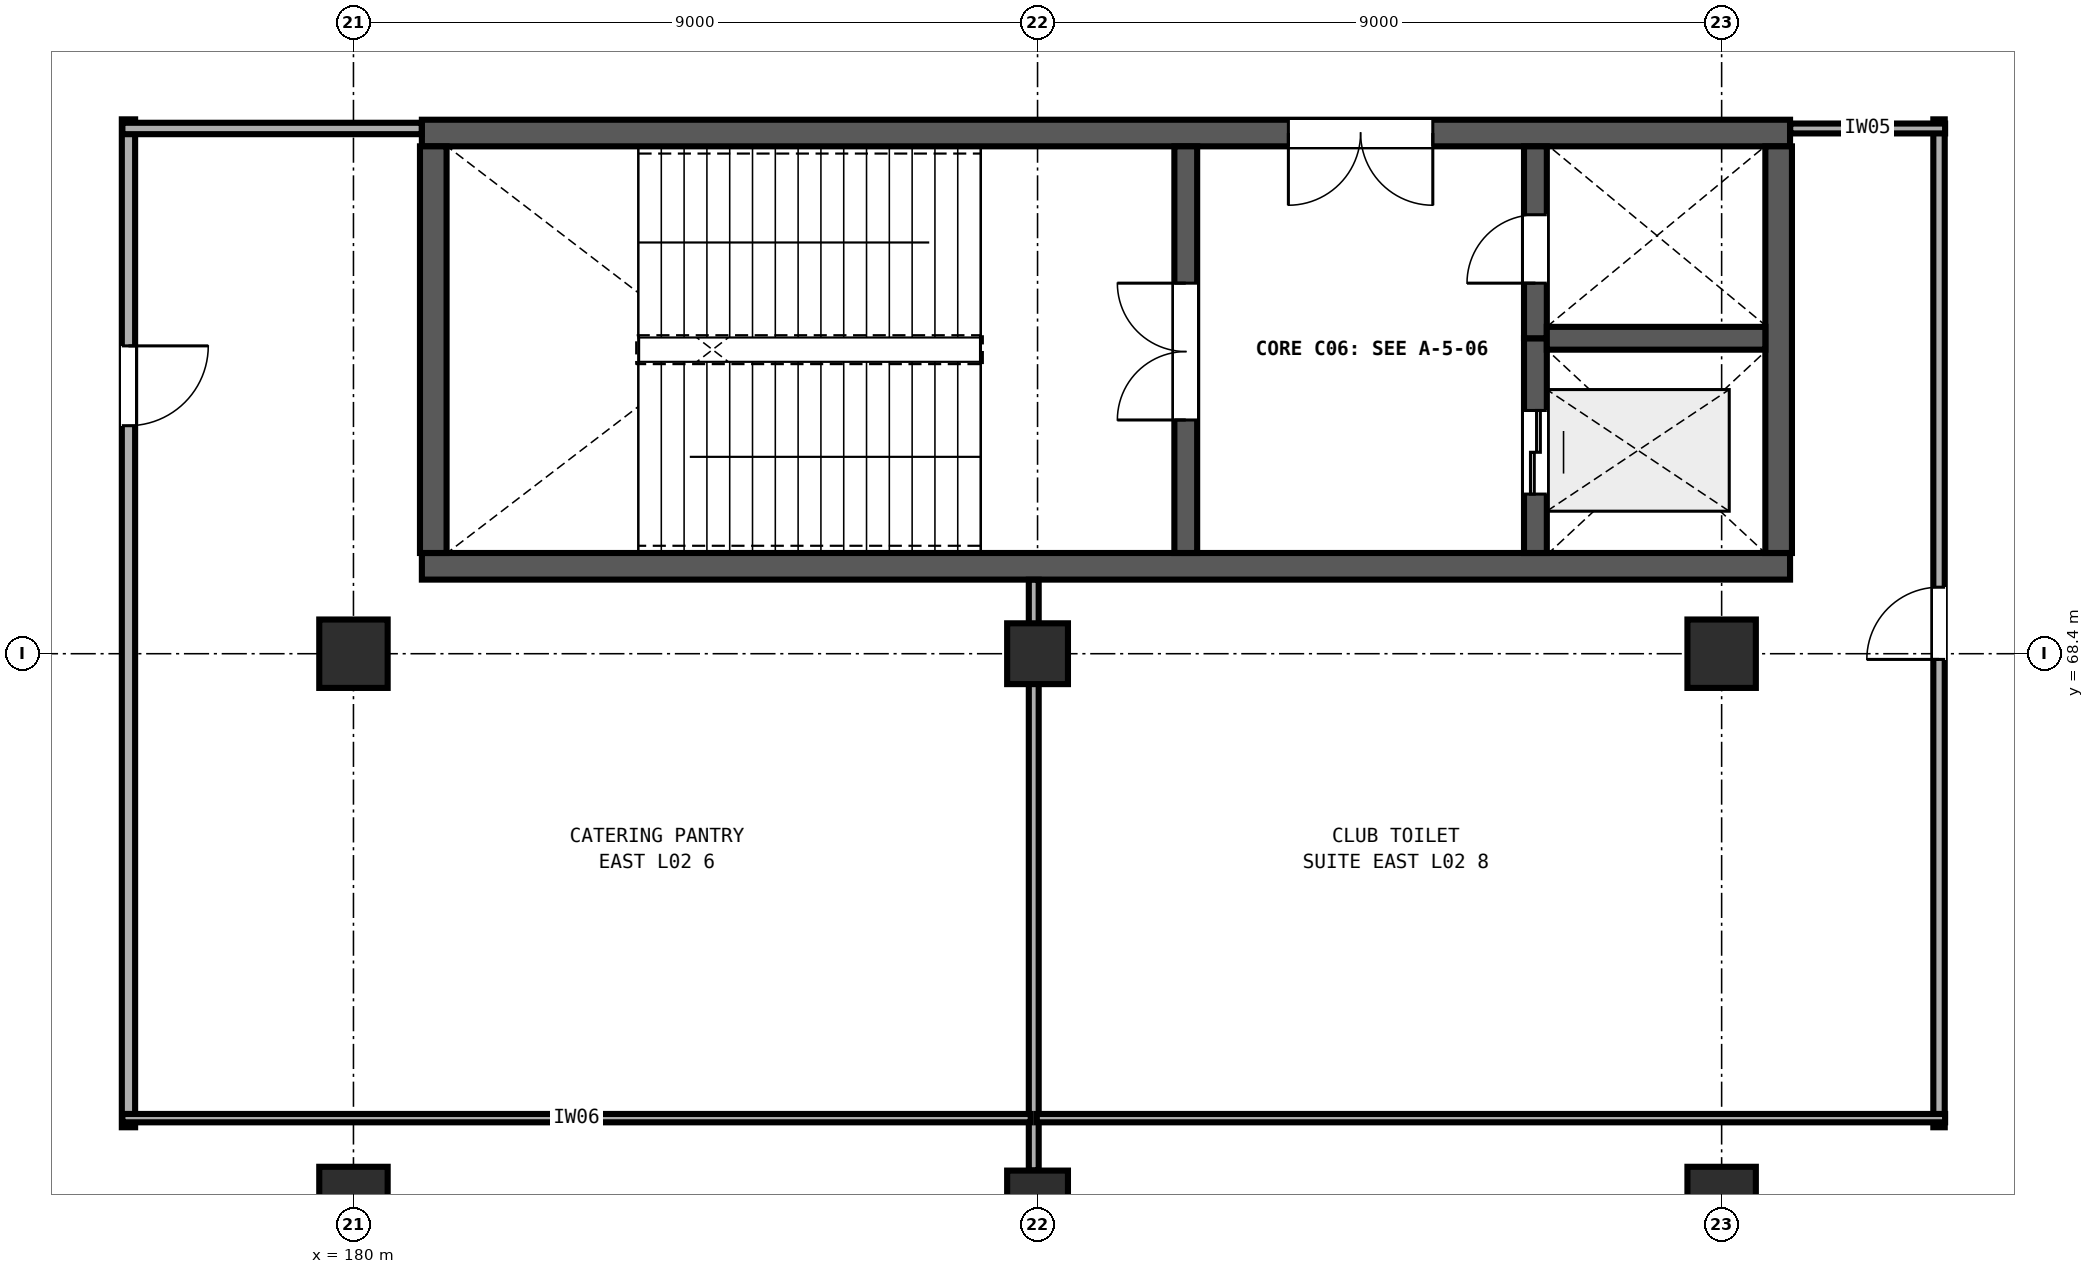
"""IFC4 building model, lengths in metres.
Left out: names, types, materials, properties, quantities, classifications, styles, units other than length and angle.
Written with IfcOpenShell. Run it as: python <this file> out.ifc"""

import sys

from ifc_helpers import new_model, si_unit, direction, frame, frame_2d, origin, origin_2d, place, context, subcontext, project, spatial, rectangle, extrude, element, fill, save


model = new_model("IFC4")
c1 = context("Model", 3, precision=1e-05, world=origin(), true_north=direction((0.0, 1.0)))
c2 = subcontext(c1, "Body", "Model", "MODEL_VIEW")
j1 = project(units=[si_unit("LENGTHUNIT", "METRE"), si_unit("PLANEANGLEUNIT", "RADIAN")], contexts=[c1])
p1 = place(None, origin())
s1 = spatial("IfcSite", under=j1, at=p1, CompositionType="ELEMENT")
p2 = place(p1, origin())
s2 = spatial("IfcBuilding", under=s1, at=p2, CompositionType="ELEMENT")
p3 = place(p2, frame((0.0, 0.0, 9.6)))
s3 = spatial("IfcBuildingStorey", under=s2, at=p3, CompositionType="ELEMENT", Elevation=9.6)
for number, where, z_axis, x_axis in (
    (1, (180.0, 61.2, 0.0), (0.0, 0.0, 1.0), (1.0, 0.0, 0.0)),
    (2, (180.0, 68.4, 0.0), (0.0, 0.0, 1.0), (1.0, 0.0, 0.0)),
):
    element("IfcColumn", number, at=place(p3, frame(where, z_axis=z_axis, x_axis=x_axis)), inside=s3, PredefinedType="COLUMN", context=c2, shape_type="SweptSolid", body=[
        extrude(rectangle(XDim=0.9, YDim=0.9, at=origin_2d()), origin(), (0.0, 0.0, 1.0), 4.8),
    ])
for number, where, z_axis, x_axis in (
    (3, (189.0, 61.2, 0.0), (0.0, 0.0, 1.0), (1.0, 0.0, 0.0)),
    (4, (189.0, 68.4, 0.0), (0.0, 0.0, 1.0), (1.0, 0.0, 0.0)),
):
    element("IfcColumn", number, at=place(p3, frame(where, z_axis=z_axis, x_axis=x_axis)), inside=s3, PredefinedType="COLUMN", context=c2, shape_type="SweptSolid", body=[
        extrude(rectangle(XDim=0.8, YDim=0.8, at=origin_2d()), origin(), (0.0, 0.0, 1.0), 4.8),
    ])
for number, where, z_axis, x_axis in (
    (5, (198.0, 61.2, 0.0), (0.0, 0.0, 1.0), (1.0, 0.0, 0.0)),
    (6, (198.0, 68.4, 0.0), (0.0, 0.0, 1.0), (1.0, 0.0, 0.0)),
):
    element("IfcColumn", number, at=place(p3, frame(where, z_axis=z_axis, x_axis=x_axis)), inside=s3, PredefinedType="COLUMN", context=c2, shape_type="SweptSolid", body=[
        extrude(rectangle(XDim=0.9, YDim=0.9, at=origin_2d()), origin(), (0.0, 0.0, 1.0), 4.8),
    ])
p4 = place(p3, frame((180.9, 69.55, 0.0), z_axis=(0.0, 0.0, 1.0), x_axis=(1.0, 0.0, 0.0)))
e7 = element("IfcWall", 7, at=p4, inside=s3, PredefinedType="SHEAR", context=c2, shape_type="SweptSolid", body=[
    extrude(rectangle(XDim=18.0, YDim=0.35, at=frame_2d((9.0, 0.0))), origin(), (0.0, 0.0, 1.0), 4.5),
])
p5 = place(p3, frame((198.9, 75.25, 0.0), z_axis=(0.0, 0.0, 1.0), x_axis=(-1.0, 0.0, 0.0)))
e8 = element("IfcWall", 8, at=p5, inside=s3, PredefinedType="SHEAR", context=c2, shape_type="SweptSolid", body=[
    extrude(rectangle(XDim=18.0, YDim=0.35, at=frame_2d((9.0, 0.0))), origin(), (0.0, 0.0, 1.0), 4.5),
])
p6 = place(p5, frame((4.7, 0.0, 0.0)))
e9 = element("IfcOpeningElement", 9, at=p6, cuts=e8, PredefinedType="OPENING", context=c2, shape_type="SweptSolid", body=[
    extrude(rectangle(XDim=1.9, YDim=2.25, at=frame_2d((0.95, 1.125))), frame((0.0, 0.185, 0.0), z_axis=(0.0, -1.0, 0.0), x_axis=(1.0, 0.0, 0.0)), (0.0, 0.0, 1.0), 0.37),
])
for number, where, z_axis, x_axis in (
    (10, (181.05, 75.075, 0.0), (0.0, 0.0, 1.0), (0.0, -1.0, 0.0)),
    (11, (198.75, 69.725, 0.0), (0.0, 0.0, 1.0), (0.0, 1.0, 0.0)),
):
    element("IfcWall", number, at=place(p3, frame(where, z_axis=z_axis, x_axis=x_axis)), inside=s3, PredefinedType="SHEAR", context=c2, shape_type="SweptSolid", body=[
        extrude(rectangle(XDim=5.35, YDim=0.35, at=frame_2d((2.675, 0.0))), origin(), (0.0, 0.0, 1.0), 4.5),
    ])
p7 = place(p3, frame((190.95, 69.725, 0.0), z_axis=(0.0, 0.0, 1.0), x_axis=(0.0, 1.0, 0.0)))
e12 = element("IfcWall", 12, at=p7, inside=s3, PredefinedType="SHEAR", context=c2, shape_type="SweptSolid", body=[
    extrude(rectangle(XDim=5.35, YDim=0.3, at=frame_2d((2.675, 0.0))), origin(), (0.0, 0.0, 1.0), 4.5),
])
p8 = place(p7, frame((1.75, 0.0, 0.0)))
e13 = element("IfcOpeningElement", 13, at=p8, cuts=e12, PredefinedType="OPENING", context=c2, shape_type="SweptSolid", body=[
    extrude(rectangle(XDim=1.8, YDim=2.25, at=frame_2d((0.9, 1.125))), frame((0.0, 0.16, 0.0), z_axis=(0.0, -1.0, 0.0), x_axis=(1.0, 0.0, 0.0)), (0.0, 0.0, 1.0), 0.32),
])
p9 = place(p3, frame((195.55, 69.725, 0.0), z_axis=(0.0, 0.0, 1.0), x_axis=(0.0, 1.0, 0.0)))
e14 = element("IfcWall", 14, at=p9, inside=s3, PredefinedType="SHEAR", context=c2, shape_type="SweptSolid", body=[
    extrude(rectangle(XDim=2.825, YDim=0.3, at=frame_2d((1.413, 0.0))), origin(), (0.0, 0.0, 1.0), 4.5),
])
p10 = place(p9, frame((0.775, 0.0, 0.0)))
e15 = element("IfcOpeningElement", 15, at=p10, cuts=e14, PredefinedType="OPENING", context=c2, shape_type="SweptSolid", body=[
    extrude(rectangle(XDim=1.1, YDim=2.1, at=frame_2d((0.55, 1.05))), frame((0.0, 0.16, 0.0), z_axis=(0.0, -1.0, 0.0), x_axis=(1.0, 0.0, 0.0)), (0.0, 0.0, 1.0), 0.32),
])
p11 = place(p3, frame((195.55, 72.55, 0.0), z_axis=(0.0, 0.0, 1.0), x_axis=(0.0, 1.0, 0.0)))
e16 = element("IfcWall", 16, at=p11, inside=s3, PredefinedType="SHEAR", context=c2, shape_type="SweptSolid", body=[
    extrude(rectangle(XDim=2.525, YDim=0.3, at=frame_2d((1.262, 0.0))), origin(), (0.0, 0.0, 1.0), 4.5),
])
p12 = place(p11, frame((0.725, 0.0, 0.0)))
e17 = element("IfcOpeningElement", 17, at=p12, cuts=e16, PredefinedType="OPENING", context=c2, shape_type="SweptSolid", body=[
    extrude(rectangle(XDim=0.9, YDim=2.1, at=frame_2d((0.45, 1.05))), frame((0.0, 0.16, 0.0), z_axis=(0.0, -1.0, 0.0), x_axis=(1.0, 0.0, 0.0)), (0.0, 0.0, 1.0), 0.32),
])
p13 = place(p3, frame((195.7, 72.55, 0.0), z_axis=(0.0, 0.0, 1.0), x_axis=(1.0, 0.0, 0.0)))
e18 = element("IfcWall", 18, at=p13, inside=s3, PredefinedType="SHEAR", context=c2, shape_type="SweptSolid", body=[
    extrude(rectangle(XDim=2.875, YDim=0.3, at=frame_2d((1.438, 0.0))), origin(), (0.0, 0.0, 1.0), 4.5),
])
p14 = place(p3, frame((177.04, 75.43, 0.0), z_axis=(0.0, 0.0, 1.0), x_axis=(0.0, -1.0, 0.0)))
e19 = element("IfcWall", 19, at=p14, inside=s3, PredefinedType="PARTITIONING", context=c2, shape_type="SweptSolid", body=[
    extrude(rectangle(XDim=13.26, YDim=0.175, at=frame_2d((6.63, 0.0))), origin(), (0.0, 0.0, 1.0), 3.56),
])
p15 = place(p14, frame((2.98, 0.0, 0.0)))
e20 = element("IfcOpeningElement", 20, at=p15, cuts=e19, PredefinedType="OPENING", context=c2, shape_type="SweptSolid", body=[
    extrude(rectangle(XDim=1.05, YDim=2.1, at=frame_2d((0.525, 1.05))), frame((0.0, 0.097, 0.0), z_axis=(0.0, -1.0, 0.0), x_axis=(1.0, 0.0, 0.0)), (0.0, 0.0, 1.0), 0.195),
])
p16 = place(p3, frame((176.96, 75.31, 0.0), z_axis=(0.0, 0.0, 1.0), x_axis=(1.0, 0.0, 0.0)))
e21 = element("IfcWall", 21, at=p16, inside=s3, PredefinedType="PARTITIONING", context=c2, shape_type="SweptSolid", body=[
    extrude(rectangle(XDim=3.938, YDim=0.15, at=frame_2d((1.969, 0.0))), origin(), (0.0, 0.0, 1.0), 3.56),
])
p17 = place(p3, frame((188.95, 69.373, 0.0), z_axis=(0.0, 0.0, 1.0), x_axis=(0.0, -1.0, 0.0)))
e22 = element("IfcWall", 22, at=p17, inside=s3, PredefinedType="PARTITIONING", context=c2, shape_type="SweptSolid", body=[
    extrude(rectangle(XDim=7.771, YDim=0.13, at=frame_2d((3.885, 0.0))), origin(), (0.0, 0.0, 1.0), 3.56),
])
p18 = place(p3, frame((188.91, 62.29, 0.0), z_axis=(0.0, 0.0, 1.0), x_axis=(-1.0, 0.0, 0.0)))
e23 = element("IfcWall", 23, at=p18, inside=s3, PredefinedType="PARTITIONING", context=c2, shape_type="SweptSolid", body=[
    extrude(rectangle(XDim=11.95, YDim=0.11, at=frame_2d((5.975, 0.0))), origin(), (0.0, 0.0, 1.0), 3.56),
])
p19 = place(p3, frame((200.86, 62.17, 0.0), z_axis=(0.0, 0.0, 1.0), x_axis=(0.0, 1.0, 0.0)))
e24 = element("IfcWall", 24, at=p19, inside=s3, PredefinedType="PARTITIONING", context=c2, shape_type="SweptSolid", body=[
    extrude(rectangle(XDim=13.26, YDim=0.15, at=frame_2d((6.63, 0.0))), origin(), (0.0, 0.0, 1.0), 3.56),
])
p20 = place(p19, frame((6.155, 0.0, 0.0)))
e25 = element("IfcOpeningElement", 25, at=p20, cuts=e24, PredefinedType="OPENING", context=c2, shape_type="SweptSolid", body=[
    extrude(rectangle(XDim=0.95, YDim=2.1, at=frame_2d((0.475, 1.05))), frame((0.0, 0.085, 0.0), z_axis=(0.0, -1.0, 0.0), x_axis=(1.0, 0.0, 0.0)), (0.0, 0.0, 1.0), 0.17),
])
p21 = place(p3, frame((198.902, 75.31, 0.0), z_axis=(0.0, 0.0, 1.0), x_axis=(1.0, 0.0, 0.0)))
e26 = element("IfcWall", 26, at=p21, inside=s3, PredefinedType="PARTITIONING", context=c2, shape_type="SweptSolid", body=[
    extrude(rectangle(XDim=2.038, YDim=0.13, at=frame_2d((1.019, 0.0))), origin(), (0.0, 0.0, 1.0), 3.56),
])
p22 = place(p3, frame((200.94, 62.29, 0.0), z_axis=(0.0, 0.0, 1.0), x_axis=(-1.0, 0.0, 0.0)))
e27 = element("IfcWall", 27, at=p22, inside=s3, PredefinedType="PARTITIONING", context=c2, shape_type="SweptSolid", body=[
    extrude(rectangle(XDim=11.95, YDim=0.11, at=frame_2d((5.975, 0.0))), origin(), (0.0, 0.0, 1.0), 3.56),
])
p23 = place(p8, origin())
e28 = element("IfcDoor", 28, at=p23, inside=s3, OperationType="DOUBLE_DOOR_SINGLE_SWING", PredefinedType="DOOR", context=c2, shape_type="SweptSolid", body=[
    extrude(rectangle(XDim=1.8, YDim=2.25, at=frame_2d((0.9, 1.125))), frame((0.0, 0.025, 0.0), z_axis=(0.0, -1.0, 0.0), x_axis=(1.0, 0.0, 0.0)), (0.0, 0.0, 1.0), 0.05),
])
fill(e13, e28)
p24 = place(p12, origin())
e29 = element("IfcDoor", 29, at=p24, inside=s3, OperationType="SINGLE_SWING_LEFT", PredefinedType="DOOR", context=c2, shape_type="SweptSolid", body=[
    extrude(rectangle(XDim=0.9, YDim=2.1, at=frame_2d((0.45, 1.05))), frame((0.0, 0.025, 0.0), z_axis=(0.0, -1.0, 0.0), x_axis=(1.0, 0.0, 0.0)), (0.0, 0.0, 1.0), 0.05),
])
fill(e17, e29)
p25 = place(p10, origin())
e30 = element("IfcDoor", 30, at=p25, inside=s3, OperationType="DOUBLE_DOOR_SLIDING", PredefinedType="DOOR", context=c2, shape_type="SweptSolid", body=[
    extrude(rectangle(XDim=1.1, YDim=2.1, at=frame_2d((0.55, 1.05))), frame((0.0, 0.025, 0.0), z_axis=(0.0, -1.0, 0.0), x_axis=(1.0, 0.0, 0.0)), (0.0, 0.0, 1.0), 0.05),
])
fill(e15, e30)
p26 = place(p6, origin())
e31 = element("IfcDoor", 31, at=p26, inside=s3, OperationType="DOUBLE_DOOR_SINGLE_SWING", PredefinedType="DOOR", context=c2, shape_type="SweptSolid", body=[
    extrude(rectangle(XDim=1.9, YDim=2.25, at=frame_2d((0.95, 1.125))), frame((0.0, 0.025, 0.0), z_axis=(0.0, -1.0, 0.0), x_axis=(1.0, 0.0, 0.0)), (0.0, 0.0, 1.0), 0.05),
])
fill(e9, e31)
p27 = place(p15, origin())
e32 = element("IfcDoor", 32, at=p27, inside=s3, OperationType="SINGLE_SWING_LEFT", PredefinedType="DOOR", context=c2, shape_type="SweptSolid", body=[
    extrude(rectangle(XDim=1.05, YDim=2.1, at=frame_2d((0.525, 1.05))), frame((0.0, 0.025, 0.0), z_axis=(0.0, -1.0, 0.0), x_axis=(1.0, 0.0, 0.0)), (0.0, 0.0, 1.0), 0.05),
])
fill(e20, e32)
p28 = place(p20, origin())
e33 = element("IfcDoor", 33, at=p28, inside=s3, OperationType="SINGLE_SWING_LEFT", PredefinedType="DOOR", context=c2, shape_type="SweptSolid", body=[
    extrude(rectangle(XDim=0.95, YDim=2.1, at=frame_2d((0.475, 1.05))), frame((0.0, 0.025, 0.0), z_axis=(0.0, -1.0, 0.0), x_axis=(1.0, 0.0, 0.0)), (0.0, 0.0, 1.0), 0.05),
])
fill(e25, e33)
save(model, sys.argv[1])
